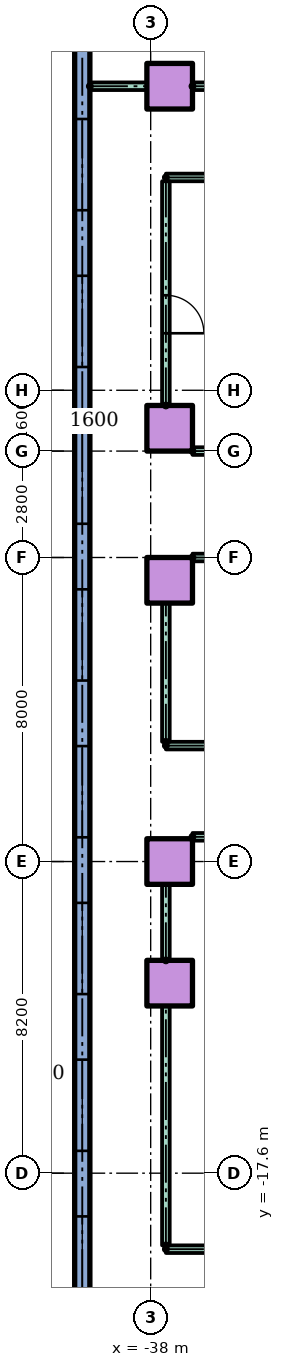
"""IFC4 building model, lengths in metres.
Left out: names, types, materials, properties, quantities, classifications, styles, units other than length and angle.
Written with IfcOpenShell. Run it as: python <this file> out.ifc"""

import sys

from ifc_helpers import new_model, si_unit, direction, frame, frame_2d, origin, origin_2d, place, context, subcontext, project, spatial, rectangle, hollow_rectangle, extrude, element, fill, save


model = new_model("IFC4")
c1 = context("Model", 3, precision=1e-05, world=origin(), true_north=direction((0.0, 1.0)))
c2 = subcontext(c1, "Body", "Model", "MODEL_VIEW")
j1 = project(units=[si_unit("LENGTHUNIT", "METRE"), si_unit("PLANEANGLEUNIT", "RADIAN")], contexts=[c1])
p1 = place(None, origin())
s1 = spatial("IfcSite", under=j1, at=p1, CompositionType="ELEMENT")
p2 = place(p1, origin())
s2 = spatial("IfcBuilding", under=s1, at=p2, CompositionType="ELEMENT")
p3 = place(p2, frame((0.0, 0.0, 22.0)))
s3 = spatial("IfcBuildingStorey", under=s2, at=p3, CompositionType="ELEMENT", Elevation=22.0)
for number, where in (
    (1, (-37.5, -12.6, 0.0)),
    (2, (-37.5, -9.4, 0.0)),
    (3, (-37.5, -2.0, 0.0)),
    (4, (-37.5, 2.0, 0.0)),
    (5, (-37.5, 11.0, 0.0)),
):
    element("IfcColumn", number, at=place(p3, frame(where)), inside=s3, PredefinedType="COLUMN", context=c2, shape_type="SweptSolid", body=[
        extrude(hollow_rectangle(XDim=1.2, YDim=1.2, WallThickness=0.06, at=origin_2d()), origin(), (0.0, 0.0, 1.0), 4.0),
    ])
p4 = place(p3, frame((-39.8, 20.0, 0.0), z_axis=(0.0, 0.0, 1.0), x_axis=(0.0, -1.0, 0.0)))
e6 = element("IfcWall", 6, at=p4, inside=s3, PredefinedType="STANDARD", context=c2, shape_type="SweptSolid", body=[
    extrude(rectangle(XDim=70.0, YDim=0.4, at=frame_2d((35.0, 0.0))), origin(), (0.0, 0.0, 1.0), 3.7),
])
p5 = place(p4, frame((1.05, 0.0, 0.9)))
e7 = element("IfcOpeningElement", 7, at=p5, cuts=e6, PredefinedType="OPENING", context=c2, shape_type="SweptSolid", body=[
    extrude(rectangle(XDim=2.4, YDim=2.1, at=frame_2d((1.2, 1.05))), frame((0.0, 0.21, 0.0), z_axis=(0.0, -1.0, 0.0), x_axis=(1.0, 0.0, 0.0)), (0.0, 0.0, 1.0), 0.42),
])
p6 = place(p4, frame((5.55, 0.0, 0.9)))
e8 = element("IfcOpeningElement", 8, at=p6, cuts=e6, PredefinedType="OPENING", context=c2, shape_type="SweptSolid", body=[
    extrude(rectangle(XDim=2.4, YDim=2.1, at=frame_2d((1.2, 1.05))), frame((0.0, 0.21, 0.0), z_axis=(0.0, -1.0, 0.0), x_axis=(1.0, 0.0, 0.0)), (0.0, 0.0, 1.0), 0.42),
])
p7 = place(p4, frame((9.863, 0.0, 0.9)))
e9 = element("IfcOpeningElement", 9, at=p7, cuts=e6, PredefinedType="OPENING", context=c2, shape_type="SweptSolid", body=[
    extrude(rectangle(XDim=2.4, YDim=2.1, at=frame_2d((1.2, 1.05))), frame((0.0, 0.21, 0.0), z_axis=(0.0, -1.0, 0.0), x_axis=(1.0, 0.0, 0.0)), (0.0, 0.0, 1.0), 0.42),
])
p8 = place(p4, frame((13.988, 0.0, 0.9)))
e10 = element("IfcOpeningElement", 10, at=p8, cuts=e6, PredefinedType="OPENING", context=c2, shape_type="SweptSolid", body=[
    extrude(rectangle(XDim=2.4, YDim=2.1, at=frame_2d((1.2, 1.05))), frame((0.0, 0.21, 0.0), z_axis=(0.0, -1.0, 0.0), x_axis=(1.0, 0.0, 0.0)), (0.0, 0.0, 1.0), 0.42),
])
p9 = place(p4, frame((18.113, 0.0, 0.9)))
e11 = element("IfcOpeningElement", 11, at=p9, cuts=e6, PredefinedType="OPENING", context=c2, shape_type="SweptSolid", body=[
    extrude(rectangle(XDim=2.4, YDim=2.1, at=frame_2d((1.2, 1.05))), frame((0.0, 0.21, 0.0), z_axis=(0.0, -1.0, 0.0), x_axis=(1.0, 0.0, 0.0)), (0.0, 0.0, 1.0), 0.42),
])
p10 = place(p4, frame((22.238, 0.0, 0.9)))
e12 = element("IfcOpeningElement", 12, at=p10, cuts=e6, PredefinedType="OPENING", context=c2, shape_type="SweptSolid", body=[
    extrude(rectangle(XDim=2.4, YDim=2.1, at=frame_2d((1.2, 1.05))), frame((0.0, 0.21, 0.0), z_axis=(0.0, -1.0, 0.0), x_axis=(1.0, 0.0, 0.0)), (0.0, 0.0, 1.0), 0.42),
])
p11 = place(p4, frame((26.363, 0.0, 0.9)))
e13 = element("IfcOpeningElement", 13, at=p11, cuts=e6, PredefinedType="OPENING", context=c2, shape_type="SweptSolid", body=[
    extrude(rectangle(XDim=2.4, YDim=2.1, at=frame_2d((1.2, 1.05))), frame((0.0, 0.21, 0.0), z_axis=(0.0, -1.0, 0.0), x_axis=(1.0, 0.0, 0.0)), (0.0, 0.0, 1.0), 0.42),
])
p12 = place(p4, frame((30.488, 0.0, 0.9)))
e14 = element("IfcOpeningElement", 14, at=p12, cuts=e6, PredefinedType="OPENING", context=c2, shape_type="SweptSolid", body=[
    extrude(rectangle(XDim=2.4, YDim=2.1, at=frame_2d((1.2, 1.05))), frame((0.0, 0.21, 0.0), z_axis=(0.0, -1.0, 0.0), x_axis=(1.0, 0.0, 0.0)), (0.0, 0.0, 1.0), 0.42),
])
p13 = place(p4, frame((34.613, 0.0, 0.9)))
e15 = element("IfcOpeningElement", 15, at=p13, cuts=e6, PredefinedType="OPENING", context=c2, shape_type="SweptSolid", body=[
    extrude(rectangle(XDim=2.4, YDim=2.1, at=frame_2d((1.2, 1.05))), frame((0.0, 0.21, 0.0), z_axis=(0.0, -1.0, 0.0), x_axis=(1.0, 0.0, 0.0)), (0.0, 0.0, 1.0), 0.42),
])
p14 = place(p4, frame((38.738, 0.0, 0.9)))
e16 = element("IfcOpeningElement", 16, at=p14, cuts=e6, PredefinedType="OPENING", context=c2, shape_type="SweptSolid", body=[
    extrude(rectangle(XDim=2.4, YDim=2.1, at=frame_2d((1.2, 1.05))), frame((0.0, 0.21, 0.0), z_axis=(0.0, -1.0, 0.0), x_axis=(1.0, 0.0, 0.0)), (0.0, 0.0, 1.0), 0.42),
])
p15 = place(p4, frame((42.55, 0.0, 0.9)))
e17 = element("IfcOpeningElement", 17, at=p15, cuts=e6, PredefinedType="OPENING", context=c2, shape_type="SweptSolid", body=[
    extrude(rectangle(XDim=2.4, YDim=2.1, at=frame_2d((1.2, 1.05))), frame((0.0, 0.21, 0.0), z_axis=(0.0, -1.0, 0.0), x_axis=(1.0, 0.0, 0.0)), (0.0, 0.0, 1.0), 0.42),
])
p16 = place(p4, frame((46.05, 0.0, 0.9)))
e18 = element("IfcOpeningElement", 18, at=p16, cuts=e6, PredefinedType="OPENING", context=c2, shape_type="SweptSolid", body=[
    extrude(rectangle(XDim=2.4, YDim=2.1, at=frame_2d((1.2, 1.05))), frame((0.0, 0.21, 0.0), z_axis=(0.0, -1.0, 0.0), x_axis=(1.0, 0.0, 0.0)), (0.0, 0.0, 1.0), 0.42),
])
p17 = place(p4, frame((49.55, 0.0, 0.9)))
e19 = element("IfcOpeningElement", 19, at=p17, cuts=e6, PredefinedType="OPENING", context=c2, shape_type="SweptSolid", body=[
    extrude(rectangle(XDim=2.4, YDim=2.1, at=frame_2d((1.2, 1.05))), frame((0.0, 0.21, 0.0), z_axis=(0.0, -1.0, 0.0), x_axis=(1.0, 0.0, 0.0)), (0.0, 0.0, 1.0), 0.42),
])
p18 = place(p4, frame((53.217, 0.0, 0.9)))
e20 = element("IfcOpeningElement", 20, at=p18, cuts=e6, PredefinedType="OPENING", context=c2, shape_type="SweptSolid", body=[
    extrude(rectangle(XDim=2.4, YDim=2.1, at=frame_2d((1.2, 1.05))), frame((0.0, 0.21, 0.0), z_axis=(0.0, -1.0, 0.0), x_axis=(1.0, 0.0, 0.0)), (0.0, 0.0, 1.0), 0.42),
])
p19 = place(p4, frame((57.05, 0.0, 0.9)))
e21 = element("IfcOpeningElement", 21, at=p19, cuts=e6, PredefinedType="OPENING", context=c2, shape_type="SweptSolid", body=[
    extrude(rectangle(XDim=2.4, YDim=2.1, at=frame_2d((1.2, 1.05))), frame((0.0, 0.21, 0.0), z_axis=(0.0, -1.0, 0.0), x_axis=(1.0, 0.0, 0.0)), (0.0, 0.0, 1.0), 0.42),
])
p20 = place(p4, frame((60.883, 0.0, 0.9)))
e22 = element("IfcOpeningElement", 22, at=p20, cuts=e6, PredefinedType="OPENING", context=c2, shape_type="SweptSolid", body=[
    extrude(rectangle(XDim=2.4, YDim=2.1, at=frame_2d((1.2, 1.05))), frame((0.0, 0.21, 0.0), z_axis=(0.0, -1.0, 0.0), x_axis=(1.0, 0.0, 0.0)), (0.0, 0.0, 1.0), 0.42),
])
p21 = place(p4, frame((66.85, 0.0, 0.9)))
e23 = element("IfcOpeningElement", 23, at=p21, cuts=e6, PredefinedType="OPENING", context=c2, shape_type="SweptSolid", body=[
    extrude(rectangle(XDim=2.4, YDim=2.1, at=frame_2d((1.2, 1.05))), frame((0.0, 0.21, 0.0), z_axis=(0.0, -1.0, 0.0), x_axis=(1.0, 0.0, 0.0)), (0.0, 0.0, 1.0), 0.42),
])
p22 = place(p3, frame((-37.6, -19.6, 0.0)))
e24 = element("IfcWall", 24, at=p22, inside=s3, PredefinedType="PARTITIONING", context=c2, shape_type="SweptSolid", body=[
    extrude(rectangle(XDim=75.2, YDim=0.2, at=frame_2d((37.6, 0.0))), origin(), (0.0, 0.0, 1.0), 3.2),
])
p23 = place(p22, frame((5.5, 0.0, 0.0)))
e25 = element("IfcOpeningElement", 25, at=p23, cuts=e24, PredefinedType="OPENING", context=c2, shape_type="SweptSolid", body=[
    extrude(rectangle(XDim=1.0, YDim=2.1, at=frame_2d((0.5, 1.05))), frame((0.0, 0.11, 0.0), z_axis=(0.0, -1.0, 0.0), x_axis=(1.0, 0.0, 0.0)), (0.0, 0.0, 1.0), 0.22),
])
p24 = place(p22, frame((17.5, 0.0, 0.0)))
e26 = element("IfcOpeningElement", 26, at=p24, cuts=e24, PredefinedType="OPENING", context=c2, shape_type="SweptSolid", body=[
    extrude(rectangle(XDim=1.0, YDim=2.1, at=frame_2d((0.5, 1.05))), frame((0.0, 0.11, 0.0), z_axis=(0.0, -1.0, 0.0), x_axis=(1.0, 0.0, 0.0)), (0.0, 0.0, 1.0), 0.22),
])
p25 = place(p22, frame((29.5, 0.0, 0.0)))
e27 = element("IfcOpeningElement", 27, at=p25, cuts=e24, PredefinedType="OPENING", context=c2, shape_type="SweptSolid", body=[
    extrude(rectangle(XDim=1.0, YDim=2.1, at=frame_2d((0.5, 1.05))), frame((0.0, 0.11, 0.0), z_axis=(0.0, -1.0, 0.0), x_axis=(1.0, 0.0, 0.0)), (0.0, 0.0, 1.0), 0.22),
])
p26 = place(p22, frame((40.5, 0.0, 0.0)))
e28 = element("IfcOpeningElement", 28, at=p26, cuts=e24, PredefinedType="OPENING", context=c2, shape_type="SweptSolid", body=[
    extrude(rectangle(XDim=1.0, YDim=2.1, at=frame_2d((0.5, 1.05))), frame((0.0, 0.11, 0.0), z_axis=(0.0, -1.0, 0.0), x_axis=(1.0, 0.0, 0.0)), (0.0, 0.0, 1.0), 0.22),
])
p27 = place(p22, frame((51.5, 0.0, 0.0)))
e29 = element("IfcOpeningElement", 29, at=p27, cuts=e24, PredefinedType="OPENING", context=c2, shape_type="SweptSolid", body=[
    extrude(rectangle(XDim=1.0, YDim=2.1, at=frame_2d((0.5, 1.05))), frame((0.0, 0.11, 0.0), z_axis=(0.0, -1.0, 0.0), x_axis=(1.0, 0.0, 0.0)), (0.0, 0.0, 1.0), 0.22),
])
p28 = place(p22, frame((66.1, 0.0, 0.0)))
e30 = element("IfcOpeningElement", 30, at=p28, cuts=e24, PredefinedType="OPENING", context=c2, shape_type="SweptSolid", body=[
    extrude(rectangle(XDim=1.0, YDim=2.1, at=frame_2d((0.5, 1.05))), frame((0.0, 0.11, 0.0), z_axis=(0.0, -1.0, 0.0), x_axis=(1.0, 0.0, 0.0)), (0.0, 0.0, 1.0), 0.22),
])
p29 = place(p3, frame((-36.9, -8.75, 0.0)))
e31 = element("IfcWall", 31, at=p29, inside=s3, PredefinedType="PARTITIONING", context=c2, shape_type="SweptSolid", body=[
    extrude(rectangle(XDim=73.8, YDim=0.2, at=frame_2d((36.9, 0.0))), origin(), (0.0, 0.0, 1.0), 3.2),
])
p30 = place(p3, frame((-37.6, -6.35, 0.0)))
e32 = element("IfcWall", 32, at=p30, inside=s3, PredefinedType="PARTITIONING", context=c2, shape_type="SweptSolid", body=[
    extrude(rectangle(XDim=75.2, YDim=0.2, at=frame_2d((37.6, 0.0))), origin(), (0.0, 0.0, 1.0), 3.2),
])
p31 = place(p30, frame((5.5, 0.0, 0.0)))
e33 = element("IfcOpeningElement", 33, at=p31, cuts=e32, PredefinedType="OPENING", context=c2, shape_type="SweptSolid", body=[
    extrude(rectangle(XDim=1.0, YDim=2.1, at=frame_2d((0.5, 1.05))), frame((0.0, 0.11, 0.0), z_axis=(0.0, -1.0, 0.0), x_axis=(1.0, 0.0, 0.0)), (0.0, 0.0, 1.0), 0.22),
])
p32 = place(p30, frame((17.55, 0.0, 0.0)))
e34 = element("IfcOpeningElement", 34, at=p32, cuts=e32, PredefinedType="OPENING", context=c2, shape_type="SweptSolid", body=[
    extrude(rectangle(XDim=0.9, YDim=2.1, at=frame_2d((0.45, 1.05))), frame((0.0, 0.11, 0.0), z_axis=(0.0, -1.0, 0.0), x_axis=(1.0, 0.0, 0.0)), (0.0, 0.0, 1.0), 0.22),
])
p33 = place(p30, frame((29.55, 0.0, 0.0)))
e35 = element("IfcOpeningElement", 35, at=p33, cuts=e32, PredefinedType="OPENING", context=c2, shape_type="SweptSolid", body=[
    extrude(rectangle(XDim=0.9, YDim=2.1, at=frame_2d((0.45, 1.05))), frame((0.0, 0.11, 0.0), z_axis=(0.0, -1.0, 0.0), x_axis=(1.0, 0.0, 0.0)), (0.0, 0.0, 1.0), 0.22),
])
p34 = place(p30, frame((40.5, 0.0, 0.0)))
e36 = element("IfcOpeningElement", 36, at=p34, cuts=e32, PredefinedType="OPENING", context=c2, shape_type="SweptSolid", body=[
    extrude(rectangle(XDim=1.0, YDim=2.1, at=frame_2d((0.5, 1.05))), frame((0.0, 0.11, 0.0), z_axis=(0.0, -1.0, 0.0), x_axis=(1.0, 0.0, 0.0)), (0.0, 0.0, 1.0), 0.22),
])
p35 = place(p30, frame((60.1, 0.0, 0.0)))
e37 = element("IfcOpeningElement", 37, at=p35, cuts=e32, PredefinedType="OPENING", context=c2, shape_type="SweptSolid", body=[
    extrude(rectangle(XDim=1.0, YDim=2.1, at=frame_2d((0.5, 1.05))), frame((0.0, 0.11, 0.0), z_axis=(0.0, -1.0, 0.0), x_axis=(1.0, 0.0, 0.0)), (0.0, 0.0, 1.0), 0.22),
])
p36 = place(p3, frame((-36.9, -1.4, 0.0)))
e38 = element("IfcWall", 38, at=p36, inside=s3, PredefinedType="PARTITIONING", context=c2, shape_type="SweptSolid", body=[
    extrude(rectangle(XDim=22.9, YDim=0.2, at=frame_2d((11.45, 0.0))), origin(), (0.0, 0.0, 1.0), 3.2),
])
p37 = place(p3, frame((-36.9, 1.4, 0.0)))
e39 = element("IfcWall", 39, at=p37, inside=s3, PredefinedType="PARTITIONING", context=c2, shape_type="SweptSolid", body=[
    extrude(rectangle(XDim=20.6, YDim=0.2, at=frame_2d((10.3, 0.0))), origin(), (0.0, 0.0, 1.0), 3.2),
])
p38 = place(p37, frame((7.9, 0.0, 0.0)))
e40 = element("IfcOpeningElement", 40, at=p38, cuts=e39, PredefinedType="OPENING", context=c2, shape_type="SweptSolid", body=[
    extrude(rectangle(XDim=1.0, YDim=2.1, at=frame_2d((0.5, 1.05))), frame((0.0, 0.11, 0.0), z_axis=(0.0, -1.0, 0.0), x_axis=(1.0, 0.0, 0.0)), (0.0, 0.0, 1.0), 0.22),
])
p39 = place(p37, frame((12.9, 0.0, 0.0)))
e41 = element("IfcOpeningElement", 41, at=p39, cuts=e39, PredefinedType="OPENING", context=c2, shape_type="SweptSolid", body=[
    extrude(rectangle(XDim=1.0, YDim=2.1, at=frame_2d((0.5, 1.05))), frame((0.0, 0.11, 0.0), z_axis=(0.0, -1.0, 0.0), x_axis=(1.0, 0.0, 0.0)), (0.0, 0.0, 1.0), 0.22),
])
p40 = place(p37, frame((16.6, 0.0, 0.0)))
e42 = element("IfcOpeningElement", 42, at=p40, cuts=e39, PredefinedType="OPENING", context=c2, shape_type="SweptSolid", body=[
    extrude(rectangle(XDim=1.0, YDim=2.1, at=frame_2d((0.5, 1.05))), frame((0.0, 0.11, 0.0), z_axis=(0.0, -1.0, 0.0), x_axis=(1.0, 0.0, 0.0)), (0.0, 0.0, 1.0), 0.22),
])
p41 = place(p37, frame((18.95, 0.0, 0.0)))
e43 = element("IfcOpeningElement", 43, at=p41, cuts=e39, PredefinedType="OPENING", context=c2, shape_type="SweptSolid", body=[
    extrude(rectangle(XDim=0.9, YDim=2.1, at=frame_2d((0.45, 1.05))), frame((0.0, 0.11, 0.0), z_axis=(0.0, -1.0, 0.0), x_axis=(1.0, 0.0, 0.0)), (0.0, 0.0, 1.0), 0.22),
])
p42 = place(p3, frame((-37.6, 8.6, 0.0)))
e44 = element("IfcWall", 44, at=p42, inside=s3, PredefinedType="PARTITIONING", context=c2, shape_type="SweptSolid", body=[
    extrude(rectangle(XDim=21.3, YDim=0.2, at=frame_2d((10.65, 0.0))), origin(), (0.0, 0.0, 1.0), 3.2),
])
p43 = place(p3, frame((-39.6, 11.0, 0.0)))
e45 = element("IfcWall", 45, at=p43, inside=s3, PredefinedType="PARTITIONING", context=c2, shape_type="SweptSolid", body=[
    extrude(rectangle(XDim=1.5, YDim=0.2, at=frame_2d((0.75, 0.0))), origin(), (0.0, 0.0, 1.0), 3.2),
])
p44 = place(p3, frame((-36.9, 11.0, 0.0)))
e46 = element("IfcWall", 46, at=p44, inside=s3, PredefinedType="PARTITIONING", context=c2, shape_type="SweptSolid", body=[
    extrude(rectangle(XDim=6.4, YDim=0.2, at=frame_2d((3.2, 0.0))), origin(), (0.0, 0.0, 1.0), 3.2),
])
p45 = place(p44, frame((1.352, 0.0, 0.0)))
e47 = element("IfcOpeningElement", 47, at=p45, cuts=e46, PredefinedType="OPENING", context=c2, shape_type="SweptSolid", body=[
    extrude(rectangle(XDim=1.0, YDim=2.1, at=frame_2d((0.5, 1.05))), frame((0.0, 0.11, 0.0), z_axis=(0.0, -1.0, 0.0), x_axis=(1.0, 0.0, 0.0)), (0.0, 0.0, 1.0), 0.22),
])
p46 = place(p44, frame((5.05, 0.0, 0.0)))
e48 = element("IfcOpeningElement", 48, at=p46, cuts=e46, PredefinedType="OPENING", context=c2, shape_type="SweptSolid", body=[
    extrude(rectangle(XDim=1.0, YDim=2.1, at=frame_2d((0.5, 1.05))), frame((0.0, 0.11, 0.0), z_axis=(0.0, -1.0, 0.0), x_axis=(1.0, 0.0, 0.0)), (0.0, 0.0, 1.0), 0.22),
])
p47 = place(p3, frame((-37.6, -19.5, 0.0), z_axis=(0.0, 0.0, 1.0), x_axis=(0.0, 1.0, 0.0)))
e49 = element("IfcWall", 49, at=p47, inside=s3, PredefinedType="PARTITIONING", context=c2, shape_type="SweptSolid", body=[
    extrude(rectangle(XDim=6.3, YDim=0.2, at=frame_2d((3.15, 0.0))), origin(), (0.0, 0.0, 1.0), 3.2),
])
p48 = place(p3, frame((-37.6, -12.0, 0.0), z_axis=(0.0, 0.0, 1.0), x_axis=(0.0, 1.0, 0.0)))
e50 = element("IfcWall", 50, at=p48, inside=s3, PredefinedType="PARTITIONING", context=c2, shape_type="SweptSolid", body=[
    extrude(rectangle(XDim=2.0, YDim=0.2, at=frame_2d((1.0, 0.0))), origin(), (0.0, 0.0, 1.0), 3.2),
])
p49 = place(p3, frame((-37.6, -6.25, 0.0), z_axis=(0.0, 0.0, 1.0), x_axis=(0.0, 1.0, 0.0)))
e51 = element("IfcWall", 51, at=p49, inside=s3, PredefinedType="PARTITIONING", context=c2, shape_type="SweptSolid", body=[
    extrude(rectangle(XDim=3.65, YDim=0.2, at=frame_2d((1.825, 0.0))), origin(), (0.0, 0.0, 1.0), 3.2),
])
p50 = place(p3, frame((-37.6, 2.6, 0.0), z_axis=(0.0, 0.0, 1.0), x_axis=(0.0, 1.0, 0.0)))
e52 = element("IfcWall", 52, at=p50, inside=s3, PredefinedType="PARTITIONING", context=c2, shape_type="SweptSolid", body=[
    extrude(rectangle(XDim=5.9, YDim=0.2, at=frame_2d((2.95, 0.0))), origin(), (0.0, 0.0, 1.0), 3.2),
])
p51 = place(p50, frame((1.9, 0.0, 0.0)))
e53 = element("IfcOpeningElement", 53, at=p51, cuts=e52, PredefinedType="OPENING", context=c2, shape_type="SweptSolid", body=[
    extrude(rectangle(XDim=1.0, YDim=2.1, at=frame_2d((0.5, 1.05))), frame((0.0, 0.11, 0.0), z_axis=(0.0, -1.0, 0.0), x_axis=(1.0, 0.0, 0.0)), (0.0, 0.0, 1.0), 0.22),
])
p52 = place(p7, origin())
e54 = element("IfcWindow", 54, at=p52, inside=s3, PartitioningType="SINGLE_PANEL", PredefinedType="WINDOW", context=c2, shape_type="SweptSolid", body=[
    extrude(rectangle(XDim=2.4, YDim=2.1, at=frame_2d((1.2, 1.05))), frame((0.0, 0.03, 0.0), z_axis=(0.0, -1.0, 0.0), x_axis=(1.0, 0.0, 0.0)), (0.0, 0.0, 1.0), 0.06),
])
fill(e9, e54)
p53 = place(p8, origin())
e55 = element("IfcWindow", 55, at=p53, inside=s3, PartitioningType="SINGLE_PANEL", PredefinedType="WINDOW", context=c2, shape_type="SweptSolid", body=[
    extrude(rectangle(XDim=2.4, YDim=2.1, at=frame_2d((1.2, 1.05))), frame((0.0, 0.03, 0.0), z_axis=(0.0, -1.0, 0.0), x_axis=(1.0, 0.0, 0.0)), (0.0, 0.0, 1.0), 0.06),
])
fill(e10, e55)
p54 = place(p9, origin())
e56 = element("IfcWindow", 56, at=p54, inside=s3, PartitioningType="SINGLE_PANEL", PredefinedType="WINDOW", context=c2, shape_type="SweptSolid", body=[
    extrude(rectangle(XDim=2.4, YDim=2.1, at=frame_2d((1.2, 1.05))), frame((0.0, 0.03, 0.0), z_axis=(0.0, -1.0, 0.0), x_axis=(1.0, 0.0, 0.0)), (0.0, 0.0, 1.0), 0.06),
])
fill(e11, e56)
p55 = place(p10, origin())
e57 = element("IfcWindow", 57, at=p55, inside=s3, PartitioningType="SINGLE_PANEL", PredefinedType="WINDOW", context=c2, shape_type="SweptSolid", body=[
    extrude(rectangle(XDim=2.4, YDim=2.1, at=frame_2d((1.2, 1.05))), frame((0.0, 0.03, 0.0), z_axis=(0.0, -1.0, 0.0), x_axis=(1.0, 0.0, 0.0)), (0.0, 0.0, 1.0), 0.06),
])
fill(e12, e57)
p56 = place(p11, origin())
e58 = element("IfcWindow", 58, at=p56, inside=s3, PartitioningType="SINGLE_PANEL", PredefinedType="WINDOW", context=c2, shape_type="SweptSolid", body=[
    extrude(rectangle(XDim=2.4, YDim=2.1, at=frame_2d((1.2, 1.05))), frame((0.0, 0.03, 0.0), z_axis=(0.0, -1.0, 0.0), x_axis=(1.0, 0.0, 0.0)), (0.0, 0.0, 1.0), 0.06),
])
fill(e13, e58)
p57 = place(p12, origin())
e59 = element("IfcWindow", 59, at=p57, inside=s3, PartitioningType="SINGLE_PANEL", PredefinedType="WINDOW", context=c2, shape_type="SweptSolid", body=[
    extrude(rectangle(XDim=2.4, YDim=2.1, at=frame_2d((1.2, 1.05))), frame((0.0, 0.03, 0.0), z_axis=(0.0, -1.0, 0.0), x_axis=(1.0, 0.0, 0.0)), (0.0, 0.0, 1.0), 0.06),
])
fill(e14, e59)
p58 = place(p13, origin())
e60 = element("IfcWindow", 60, at=p58, inside=s3, PartitioningType="SINGLE_PANEL", PredefinedType="WINDOW", context=c2, shape_type="SweptSolid", body=[
    extrude(rectangle(XDim=2.4, YDim=2.1, at=frame_2d((1.2, 1.05))), frame((0.0, 0.03, 0.0), z_axis=(0.0, -1.0, 0.0), x_axis=(1.0, 0.0, 0.0)), (0.0, 0.0, 1.0), 0.06),
])
fill(e15, e60)
p59 = place(p14, origin())
e61 = element("IfcWindow", 61, at=p59, inside=s3, PartitioningType="SINGLE_PANEL", PredefinedType="WINDOW", context=c2, shape_type="SweptSolid", body=[
    extrude(rectangle(XDim=2.4, YDim=2.1, at=frame_2d((1.2, 1.05))), frame((0.0, 0.03, 0.0), z_axis=(0.0, -1.0, 0.0), x_axis=(1.0, 0.0, 0.0)), (0.0, 0.0, 1.0), 0.06),
])
fill(e16, e61)
p60 = place(p51, frame((1.0, 0.0, 0.0), z_axis=(0.0, 0.0, 1.0), x_axis=(-1.0, 0.0, 0.0)))
e62 = element("IfcDoor", 62, at=p60, inside=s3, OperationType="SINGLE_SWING_LEFT", PredefinedType="DOOR", context=c2, shape_type="SweptSolid", body=[
    extrude(rectangle(XDim=1.0, YDim=2.1, at=frame_2d((0.5, 1.05))), frame((0.0, 0.025, 0.0), z_axis=(0.0, -1.0, 0.0), x_axis=(1.0, 0.0, 0.0)), (0.0, 0.0, 1.0), 0.05),
])
fill(e53, e62)
save(model, sys.argv[1])
